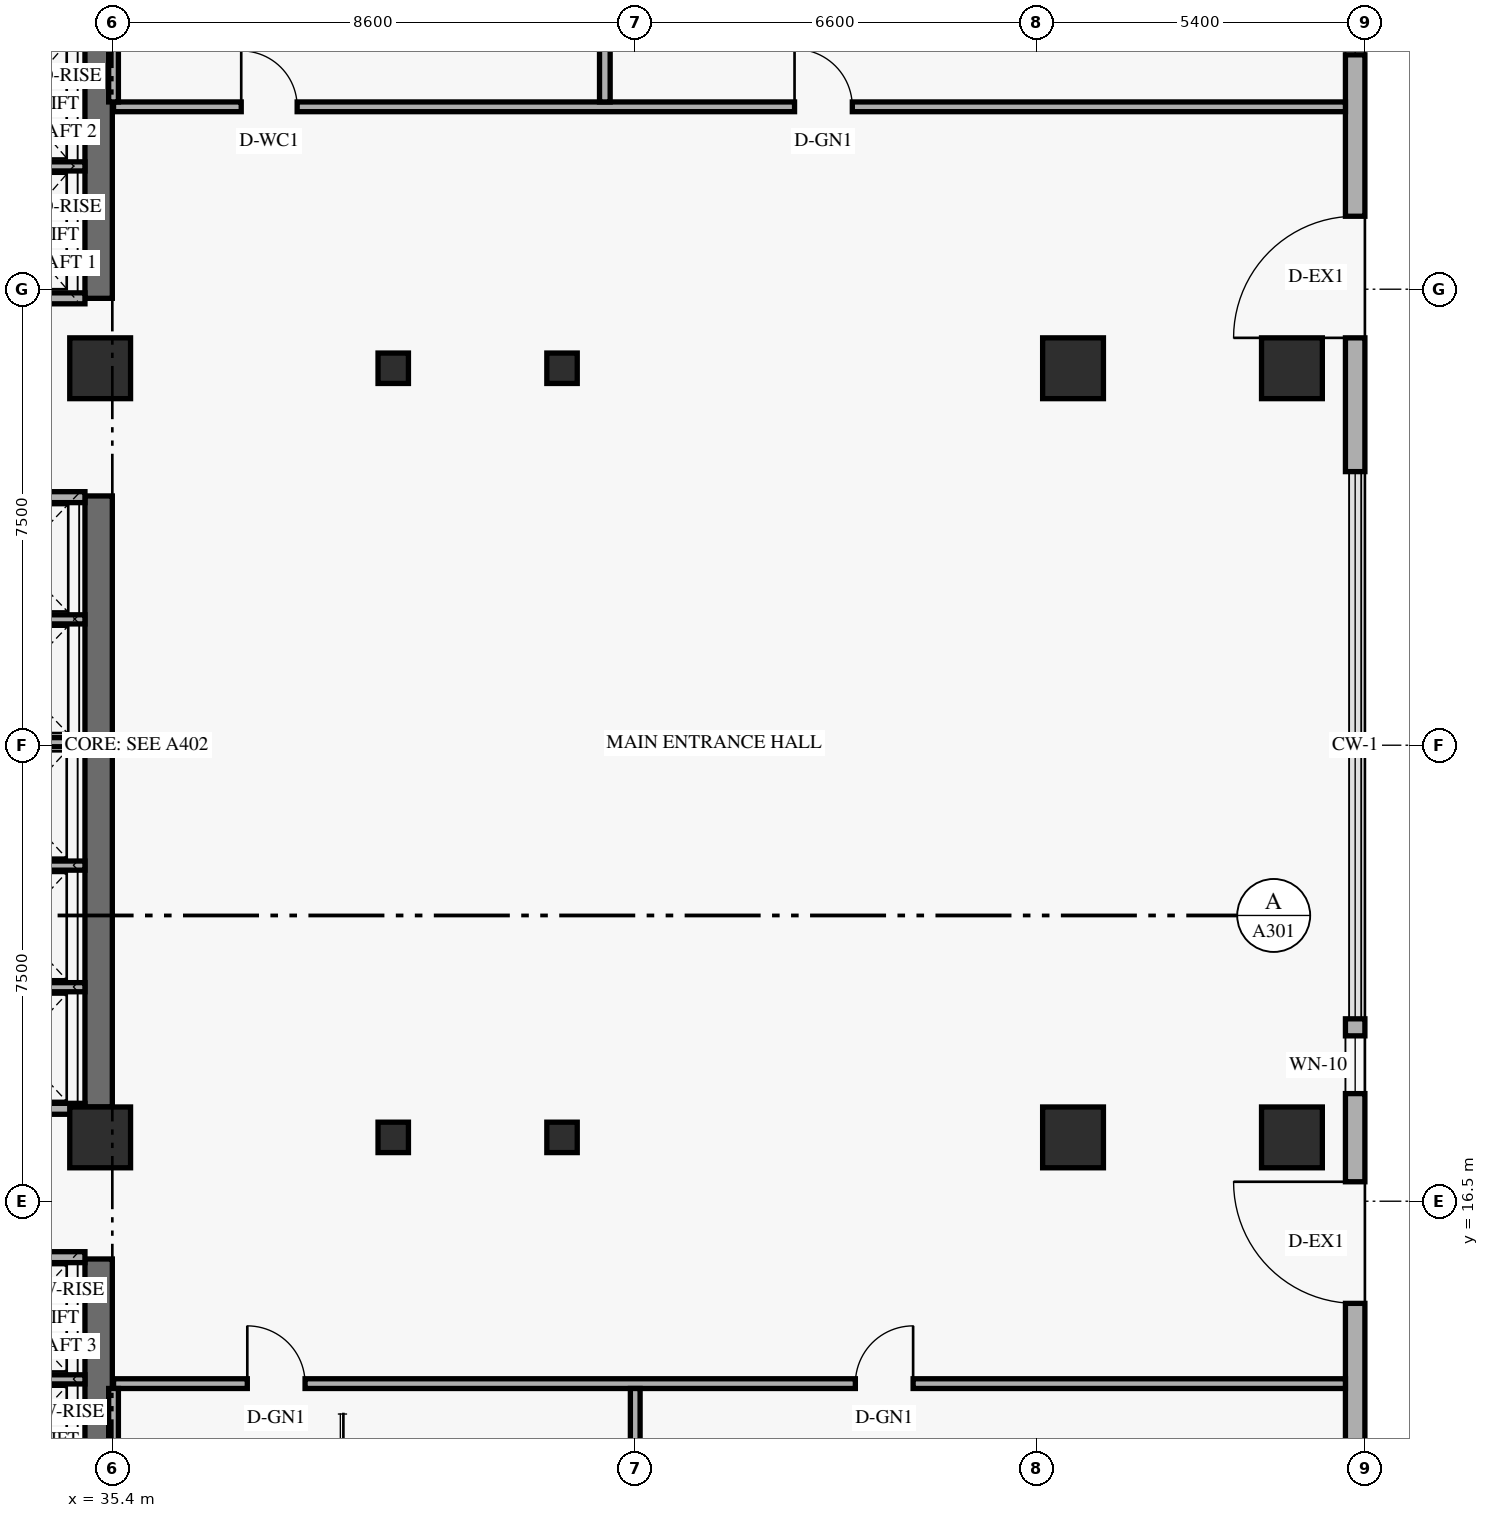
"""IFC4 building model, lengths in metres.
Left out: names, types, materials, properties, quantities, classifications, styles, units other than length and angle.
Written with IfcOpenShell. Run it as: python <this file> out.ifc"""

import sys

from ifc_helpers import new_model, si_unit, direction, frame, frame_2d, origin, origin_2d, place, context, subcontext, project, spatial, rectangle, hollow_rectangle, extrude, element, fill, save


model = new_model("IFC4")
c1 = context("Model", 3, precision=1e-05, world=origin(), true_north=direction((0.0, 1.0)))
c2 = subcontext(c1, "Body", "Model", "MODEL_VIEW")
j1 = project(units=[si_unit("LENGTHUNIT", "METRE"), si_unit("PLANEANGLEUNIT", "RADIAN")], contexts=[c1])
p1 = place(None, origin())
s1 = spatial("IfcSite", under=j1, at=p1, CompositionType="ELEMENT")
p2 = place(p1, origin())
s2 = spatial("IfcBuilding", under=s1, at=p2, CompositionType="ELEMENT")
p3 = place(p2, origin())
s3 = spatial("IfcBuildingStorey", under=s2, at=p3, CompositionType="ELEMENT", Elevation=0.0)
p4 = place(p3, frame((35.175, 9.75, 0.0), z_axis=(0.0, 0.0, 1.0), x_axis=(0.0, 1.0, 0.0)))
e1 = element("IfcWall", 1, at=p4, inside=s3, PredefinedType="SHEAR", context=c2, shape_type="SweptSolid", body=[
    extrude(rectangle(XDim=5.8, YDim=0.45, at=frame_2d((2.9, 0.0))), origin(), (0.0, 0.0, 1.0), 3.539),
])
p5 = place(p3, frame((35.175, 18.05, 0.0), z_axis=(0.0, 0.0, 1.0), x_axis=(0.0, 1.0, 0.0)))
e2 = element("IfcWall", 2, at=p5, inside=s3, PredefinedType="SHEAR", context=c2, shape_type="SweptSolid", body=[
    extrude(rectangle(XDim=10.05, YDim=0.45, at=frame_2d((5.025, 0.0))), origin(), (0.0, 0.0, 1.0), 3.539),
])
p6 = place(p3, frame((35.175, 31.35, 0.0), z_axis=(0.0, 0.0, 1.0), x_axis=(0.0, 1.0, 0.0)))
e3 = element("IfcWall", 3, at=p6, inside=s3, PredefinedType="SHEAR", context=c2, shape_type="SweptSolid", body=[
    extrude(rectangle(XDim=6.9, YDim=0.45, at=frame_2d((3.45, 0.0))), origin(), (0.0, 0.0, 1.0), 3.539),
])
for number, where, z_axis, x_axis in (
    (4, (35.2, 17.55, 0.0), (0.0, 0.0, 1.0), (1.0, 0.0, 0.0)),
    (5, (35.2, 30.2, 0.0), (0.0, 0.0, 1.0), (1.0, 0.0, 0.0)),
):
    element("IfcColumn", number, at=place(p3, frame(where, z_axis=z_axis, x_axis=x_axis)), inside=s3, PredefinedType="COLUMN", context=c2, shape_type="SweptSolid", body=[
        extrude(rectangle(XDim=1.0, YDim=1.0, at=origin_2d()), origin(), (0.0, 0.0, 1.0), 4.8),
    ])
for number, where, z_axis, x_axis in (
    (6, (39.936, 17.55, 0.0), (0.035, 0.0, 0.999), (0.0, 1.0, 0.0)),
    (7, (39.936, 30.2, 0.0), (0.035, 0.0, 0.999), (0.0, 1.0, 0.0)),
):
    element("IfcColumn", number, at=place(p3, frame(where, z_axis=z_axis, x_axis=x_axis)), inside=s3, PredefinedType="COLUMN", context=c2, shape_type="SweptSolid", body=[
        extrude(hollow_rectangle(XDim=0.5, YDim=0.5, WallThickness=0.022, at=origin_2d()), origin(), (0.0, 0.0, 1.0), 4.803),
    ])
for number, where, z_axis, x_axis in (
    (8, (42.657, 17.55, 0.0), (0.058, 0.0, 0.998), (0.0, 1.0, 0.0)),
    (9, (42.657, 30.2, 0.0), (0.058, 0.0, 0.998), (0.0, 1.0, 0.0)),
):
    element("IfcColumn", number, at=place(p3, frame(where, z_axis=z_axis, x_axis=x_axis)), inside=s3, PredefinedType="COLUMN", context=c2, shape_type="SweptSolid", body=[
        extrude(hollow_rectangle(XDim=0.5, YDim=0.5, WallThickness=0.022, at=origin_2d()), origin(), (0.0, 0.0, 1.0), 4.808),
    ])
for number, where, z_axis, x_axis in (
    (10, (51.2, 17.55, 0.0), (0.0, 0.0, 1.0), (1.0, 0.0, 0.0)),
    (11, (51.2, 30.2, 0.0), (0.0, 0.0, 1.0), (1.0, 0.0, 0.0)),
    (12, (54.8, 17.55, 0.0), (0.0, 0.0, 1.0), (1.0, 0.0, 0.0)),
    (13, (54.8, 30.2, 0.0), (0.0, 0.0, 1.0), (1.0, 0.0, 0.0)),
):
    element("IfcColumn", number, at=place(p3, frame(where, z_axis=z_axis, x_axis=x_axis)), inside=s3, PredefinedType="COLUMN", context=c2, shape_type="SweptSolid", body=[
        extrude(rectangle(XDim=1.0, YDim=1.0, at=origin_2d()), origin(), (0.0, 0.0, 1.0), 4.8),
    ])
p7 = place(p3, frame((55.84, 0.32, 0.0), z_axis=(0.0, 0.0, 1.0), x_axis=(0.0, 1.0, 0.0)))
e14 = element("IfcWall", 14, at=p7, inside=s3, PredefinedType="SOLIDWALL", context=c2, shape_type="SweptSolid", body=[
    extrude(rectangle(XDim=19.18, YDim=0.32, at=frame_2d((9.59, 0.0))), origin(), (0.0, 0.0, 1.0), 4.39),
])
p8 = place(p7, frame((14.5, 0.0, 0.0)))
e15 = element("IfcOpeningElement", 15, at=p8, cuts=e14, PredefinedType="OPENING", context=c2, shape_type="SweptSolid", body=[
    extrude(rectangle(XDim=2.0, YDim=2.35, at=frame_2d((1.0, 1.175))), frame((0.0, 0.17, 0.0), z_axis=(0.0, -1.0, 0.0), x_axis=(1.0, 0.0, 0.0)), (0.0, 0.0, 1.0), 0.34),
])
p9 = place(p7, frame((1.67, 0.0, 0.85)))
e16 = element("IfcOpeningElement", 16, at=p9, cuts=e14, PredefinedType="OPENING", context=c2, shape_type="SweptSolid", body=[
    extrude(rectangle(XDim=2.1, YDim=1.75, at=frame_2d((1.05, 0.875))), frame((0.0, 0.17, 0.0), z_axis=(0.0, -1.0, 0.0), x_axis=(1.0, 0.0, 0.0)), (0.0, 0.0, 1.0), 0.34),
])
p10 = place(p7, frame((17.95, 0.0, 0.85)))
e17 = element("IfcOpeningElement", 17, at=p10, cuts=e14, PredefinedType="OPENING", context=c2, shape_type="SweptSolid", body=[
    extrude(rectangle(XDim=0.95, YDim=1.5, at=frame_2d((0.475, 0.75))), frame((0.0, 0.17, 0.0), z_axis=(0.0, -1.0, 0.0), x_axis=(1.0, 0.0, 0.0)), (0.0, 0.0, 1.0), 0.34),
])
p11 = place(p3, frame((55.84, 28.5, 0.0), z_axis=(0.0, 0.0, 1.0), x_axis=(0.0, 1.0, 0.0)))
e18 = element("IfcWall", 18, at=p11, inside=s3, PredefinedType="SOLIDWALL", context=c2, shape_type="SweptSolid", body=[
    extrude(rectangle(XDim=26.98, YDim=0.32, at=frame_2d((13.49, 0.0))), origin(), (0.0, 0.0, 1.0), 4.39),
])
p12 = place(p11, frame((2.2, 0.0, 0.0)))
e19 = element("IfcOpeningElement", 19, at=p12, cuts=e18, PredefinedType="OPENING", context=c2, shape_type="SweptSolid", body=[
    extrude(rectangle(XDim=2.0, YDim=2.35, at=frame_2d((1.0, 1.175))), frame((0.0, 0.17, 0.0), z_axis=(0.0, -1.0, 0.0), x_axis=(1.0, 0.0, 0.0)), (0.0, 0.0, 1.0), 0.34),
])
p13 = place(p11, frame((6.855, 0.0, 0.85)))
e20 = element("IfcOpeningElement", 20, at=p13, cuts=e18, PredefinedType="OPENING", context=c2, shape_type="SweptSolid", body=[
    extrude(rectangle(XDim=2.1, YDim=1.75, at=frame_2d((1.05, 0.875))), frame((0.0, 0.17, 0.0), z_axis=(0.0, -1.0, 0.0), x_axis=(1.0, 0.0, 0.0)), (0.0, 0.0, 1.0), 0.34),
])
p14 = place(p11, frame((20.03, 0.0, 0.85)))
e21 = element("IfcOpeningElement", 21, at=p14, cuts=e18, PredefinedType="OPENING", context=c2, shape_type="SweptSolid", body=[
    extrude(rectangle(XDim=2.1, YDim=1.75, at=frame_2d((1.05, 0.875))), frame((0.0, 0.17, 0.0), z_axis=(0.0, -1.0, 0.0), x_axis=(1.0, 0.0, 0.0)), (0.0, 0.0, 1.0), 0.34),
])
p15 = place(p3, frame((32.74, 15.58, 0.0), z_axis=(0.0, 0.0, 1.0), x_axis=(1.0, 0.0, 0.0)))
e22 = element("IfcWall", 22, at=p15, inside=s3, PredefinedType="STANDARD", context=c2, shape_type="SweptSolid", body=[
    extrude(rectangle(XDim=2.21, YDim=0.18, at=frame_2d((1.105, 0.0))), origin(), (0.0, 0.0, 1.0), 4.39),
])
p16 = place(p3, frame((32.74, 13.57, 0.0), z_axis=(0.0, 0.0, 1.0), x_axis=(1.0, 0.0, 0.0)))
e23 = element("IfcWall", 23, at=p16, inside=s3, PredefinedType="STANDARD", context=c2, shape_type="SweptSolid", body=[
    extrude(rectangle(XDim=2.21, YDim=0.15, at=frame_2d((1.105, 0.0))), origin(), (0.0, 0.0, 1.0), 4.39),
])
for number, where, z_axis, x_axis in (
    (24, (32.74, 18.02, 0.0), (0.0, 0.0, 1.0), (1.0, 0.0, 0.0)),
    (25, (32.74, 28.08, 0.0), (0.0, 0.0, 1.0), (1.0, 0.0, 0.0)),
):
    element("IfcWall", number, at=place(p3, frame(where, z_axis=z_axis, x_axis=x_axis)), inside=s3, PredefinedType="STANDARD", context=c2, shape_type="SweptSolid", body=[
        extrude(rectangle(XDim=2.21, YDim=0.18, at=frame_2d((1.105, 0.0))), origin(), (0.0, 0.0, 1.0), 4.39),
    ])
for number, where, z_axis, x_axis in (
    (26, (32.74, 20.02, 0.0), (0.0, 0.0, 1.0), (1.0, 0.0, 0.0)),
    (27, (32.74, 22.02, 0.0), (0.0, 0.0, 1.0), (1.0, 0.0, 0.0)),
    (28, (32.74, 24.05, 0.0), (0.0, 0.0, 1.0), (1.0, 0.0, 0.0)),
    (29, (32.74, 26.07, 0.0), (0.0, 0.0, 1.0), (1.0, 0.0, 0.0)),
):
    element("IfcWall", number, at=place(p3, frame(where, z_axis=z_axis, x_axis=x_axis)), inside=s3, PredefinedType="STANDARD", context=c2, shape_type="SweptSolid", body=[
        extrude(rectangle(XDim=2.21, YDim=0.15, at=frame_2d((1.105, 0.0))), origin(), (0.0, 0.0, 1.0), 4.39),
    ])
p17 = place(p3, frame((32.74, 31.35, 0.0), z_axis=(0.0, 0.0, 1.0), x_axis=(1.0, 0.0, 0.0)))
e30 = element("IfcWall", 30, at=p17, inside=s3, PredefinedType="STANDARD", context=c2, shape_type="SweptSolid", body=[
    extrude(rectangle(XDim=2.21, YDim=0.18, at=frame_2d((1.105, 0.0))), origin(), (0.0, 0.0, 1.0), 4.39),
])
p18 = place(p3, frame((32.74, 33.52, 0.0), z_axis=(0.0, 0.0, 1.0), x_axis=(1.0, 0.0, 0.0)))
e31 = element("IfcWall", 31, at=p18, inside=s3, PredefinedType="STANDARD", context=c2, shape_type="SweptSolid", body=[
    extrude(rectangle(XDim=2.21, YDim=0.15, at=frame_2d((1.105, 0.0))), origin(), (0.0, 0.0, 1.0), 4.39),
])
p19 = place(p3, frame((35.42, 13.5, 0.0), z_axis=(0.0, 0.0, 1.0), x_axis=(1.0, 0.0, 0.0)))
e32 = element("IfcWall", 32, at=p19, inside=s3, PredefinedType="PARTITIONING", context=c2, shape_type="SweptSolid", body=[
    extrude(rectangle(XDim=20.26, YDim=0.16, at=frame_2d((10.13, 0.0))), origin(), (0.0, 0.0, 1.0), 3.521),
])
p20 = place(p19, frame((2.2, 0.0, 0.0)))
e33 = element("IfcOpeningElement", 33, at=p20, cuts=e32, PredefinedType="OPENING", context=c2, shape_type="SweptSolid", body=[
    extrude(rectangle(XDim=0.95, YDim=2.15, at=frame_2d((0.475, 1.075))), frame((0.0, 0.09, 0.0), z_axis=(0.0, -1.0, 0.0), x_axis=(1.0, 0.0, 0.0)), (0.0, 0.0, 1.0), 0.18),
])
p21 = place(p19, frame((12.2, 0.0, 0.0)))
e34 = element("IfcOpeningElement", 34, at=p21, cuts=e32, PredefinedType="OPENING", context=c2, shape_type="SweptSolid", body=[
    extrude(rectangle(XDim=0.95, YDim=2.15, at=frame_2d((0.475, 1.075))), frame((0.0, 0.09, 0.0), z_axis=(0.0, -1.0, 0.0), x_axis=(1.0, 0.0, 0.0)), (0.0, 0.0, 1.0), 0.18),
])
p22 = place(p3, frame((35.42, 9.25, 0.0), z_axis=(0.0, 0.0, 1.0), x_axis=(0.0, 1.0, 0.0)))
e35 = element("IfcWall", 35, at=p22, inside=s3, PredefinedType="PARTITIONING", context=c2, shape_type="SweptSolid", body=[
    extrude(rectangle(XDim=4.17, YDim=0.16, at=frame_2d((2.085, 0.0))), origin(), (0.0, 0.0, 1.0), 3.521),
])
p23 = place(p3, frame((35.42, 34.5, 0.0), z_axis=(0.0, 0.0, 1.0), x_axis=(1.0, 0.0, 0.0)))
e36 = element("IfcWall", 36, at=p23, inside=s3, PredefinedType="PARTITIONING", context=c2, shape_type="SweptSolid", body=[
    extrude(rectangle(XDim=20.26, YDim=0.16, at=frame_2d((10.13, 0.0))), origin(), (0.0, 0.0, 1.0), 3.521),
])
p24 = place(p23, frame((2.1, 0.0, 0.0)))
e37 = element("IfcOpeningElement", 37, at=p24, cuts=e36, PredefinedType="OPENING", context=c2, shape_type="SweptSolid", body=[
    extrude(rectangle(XDim=0.92, YDim=2.14, at=frame_2d((0.46, 1.07))), frame((0.0, 0.09, 0.0), z_axis=(0.0, -1.0, 0.0), x_axis=(1.0, 0.0, 0.0)), (0.0, 0.0, 1.0), 0.18),
])
p25 = place(p23, frame((11.2, 0.0, 0.0)))
e38 = element("IfcOpeningElement", 38, at=p25, cuts=e36, PredefinedType="OPENING", context=c2, shape_type="SweptSolid", body=[
    extrude(rectangle(XDim=0.95, YDim=2.15, at=frame_2d((0.475, 1.075))), frame((0.0, 0.09, 0.0), z_axis=(0.0, -1.0, 0.0), x_axis=(1.0, 0.0, 0.0)), (0.0, 0.0, 1.0), 0.18),
])
p26 = place(p3, frame((35.42, 34.58, 0.0), z_axis=(0.0, 0.0, 1.0), x_axis=(0.0, 1.0, 0.0)))
e39 = element("IfcWall", 39, at=p26, inside=s3, PredefinedType="PARTITIONING", context=c2, shape_type="SweptSolid", body=[
    extrude(rectangle(XDim=4.17, YDim=0.16, at=frame_2d((2.085, 0.0))), origin(), (0.0, 0.0, 1.0), 3.521),
])
p27 = place(p3, frame((43.5, 34.58, 0.0), z_axis=(0.0, 0.0, 1.0), x_axis=(0.0, 1.0, 0.0)))
e40 = element("IfcWall", 40, at=p27, inside=s3, PredefinedType="PLUMBINGWALL", context=c2, shape_type="SweptSolid", body=[
    extrude(rectangle(XDim=10.54, YDim=0.175, at=frame_2d((5.27, 0.0))), origin(), (0.0, 0.0, 1.0), 3.272),
])
p28 = place(p27, frame((5.74, 0.0, 0.0)))
e41 = element("IfcOpeningElement", 41, at=p28, cuts=e40, PredefinedType="OPENING", context=c2, shape_type="SweptSolid", body=[
    extrude(rectangle(XDim=0.95, YDim=2.14, at=frame_2d((0.475, 1.07))), frame((0.0, 0.097, 0.0), z_axis=(0.0, -1.0, 0.0), x_axis=(1.0, 0.0, 0.0)), (0.0, 0.0, 1.0), 0.195),
])
p29 = place(p3, frame((44.0, 0.32, 0.0), z_axis=(0.0, 0.0, 1.0), x_axis=(0.0, 1.0, 0.0)))
e42 = element("IfcWall", 42, at=p29, inside=s3, PredefinedType="PARTITIONING", context=c2, shape_type="SweptSolid", body=[
    extrude(rectangle(XDim=13.1, YDim=0.16, at=frame_2d((6.55, 0.0))), origin(), (0.0, 0.0, 1.0), 3.272),
])
p30 = place(p8, frame((2.0, 0.0, 0.0), z_axis=(0.0, 0.0, 1.0), x_axis=(-1.0, 0.0, 0.0)))
e43 = element("IfcDoor", 43, at=p30, inside=s3, OperationType="SINGLE_SWING_LEFT", PredefinedType="DOOR", context=c2, shape_type="SweptSolid", body=[
    extrude(rectangle(XDim=2.0, YDim=2.35, at=frame_2d((1.0, 1.175))), frame((0.0, 0.025, 0.0), z_axis=(0.0, -1.0, 0.0), x_axis=(1.0, 0.0, 0.0)), (0.0, 0.0, 1.0), 0.05),
])
fill(e15, e43)
p31 = place(p10, origin())
e44 = element("IfcWindow", 44, at=p31, inside=s3, PartitioningType="SINGLE_PANEL", PredefinedType="WINDOW", context=c2, shape_type="SweptSolid", body=[
    extrude(rectangle(XDim=0.95, YDim=1.5, at=frame_2d((0.475, 0.75))), frame((0.0, 0.03, 0.0), z_axis=(0.0, -1.0, 0.0), x_axis=(1.0, 0.0, 0.0)), (0.0, 0.0, 1.0), 0.06),
])
fill(e17, e44)
p32 = place(p12, frame((2.0, 0.0, 0.0), z_axis=(0.0, 0.0, 1.0), x_axis=(-1.0, 0.0, 0.0)))
e45 = element("IfcDoor", 45, at=p32, inside=s3, OperationType="SINGLE_SWING_RIGHT", PredefinedType="DOOR", context=c2, shape_type="SweptSolid", body=[
    extrude(rectangle(XDim=2.0, YDim=2.35, at=frame_2d((1.0, 1.175))), frame((0.0, 0.025, 0.0), z_axis=(0.0, -1.0, 0.0), x_axis=(1.0, 0.0, 0.0)), (0.0, 0.0, 1.0), 0.05),
])
fill(e19, e45)
p33 = place(p13, origin())
e46 = element("IfcWindow", 46, at=p33, inside=s3, PartitioningType="SINGLE_PANEL", PredefinedType="WINDOW", context=c2, shape_type="SweptSolid", body=[
    extrude(rectangle(XDim=2.1, YDim=1.75, at=frame_2d((1.05, 0.875))), frame((0.0, 0.03, 0.0), z_axis=(0.0, -1.0, 0.0), x_axis=(1.0, 0.0, 0.0)), (0.0, 0.0, 1.0), 0.06),
])
fill(e20, e46)
p34 = place(p20, origin())
e47 = element("IfcDoor", 47, at=p34, inside=s3, OperationType="SINGLE_SWING_LEFT", PredefinedType="DOOR", context=c2, shape_type="SweptSolid", body=[
    extrude(rectangle(XDim=0.95, YDim=2.15, at=frame_2d((0.475, 1.075))), frame((0.0, 0.025, 0.0), z_axis=(0.0, -1.0, 0.0), x_axis=(1.0, 0.0, 0.0)), (0.0, 0.0, 1.0), 0.05),
])
fill(e33, e47)
p35 = place(p21, origin())
e48 = element("IfcDoor", 48, at=p35, inside=s3, OperationType="SINGLE_SWING_RIGHT", PredefinedType="DOOR", context=c2, shape_type="SweptSolid", body=[
    extrude(rectangle(XDim=0.95, YDim=2.15, at=frame_2d((0.475, 1.075))), frame((0.0, 0.025, 0.0), z_axis=(0.0, -1.0, 0.0), x_axis=(1.0, 0.0, 0.0)), (0.0, 0.0, 1.0), 0.05),
])
fill(e34, e48)
p36 = place(p24, origin())
e49 = element("IfcDoor", 49, at=p36, inside=s3, OperationType="SINGLE_SWING_LEFT", PredefinedType="DOOR", context=c2, shape_type="SweptSolid", body=[
    extrude(rectangle(XDim=0.92, YDim=2.14, at=frame_2d((0.46, 1.07))), frame((0.0, 0.025, 0.0), z_axis=(0.0, -1.0, 0.0), x_axis=(1.0, 0.0, 0.0)), (0.0, 0.0, 1.0), 0.05),
])
fill(e37, e49)
p37 = place(p25, origin())
e50 = element("IfcDoor", 50, at=p37, inside=s3, OperationType="SINGLE_SWING_LEFT", PredefinedType="DOOR", context=c2, shape_type="SweptSolid", body=[
    extrude(rectangle(XDim=0.95, YDim=2.15, at=frame_2d((0.475, 1.075))), frame((0.0, 0.025, 0.0), z_axis=(0.0, -1.0, 0.0), x_axis=(1.0, 0.0, 0.0)), (0.0, 0.0, 1.0), 0.05),
])
fill(e38, e50)
save(model, sys.argv[1])
